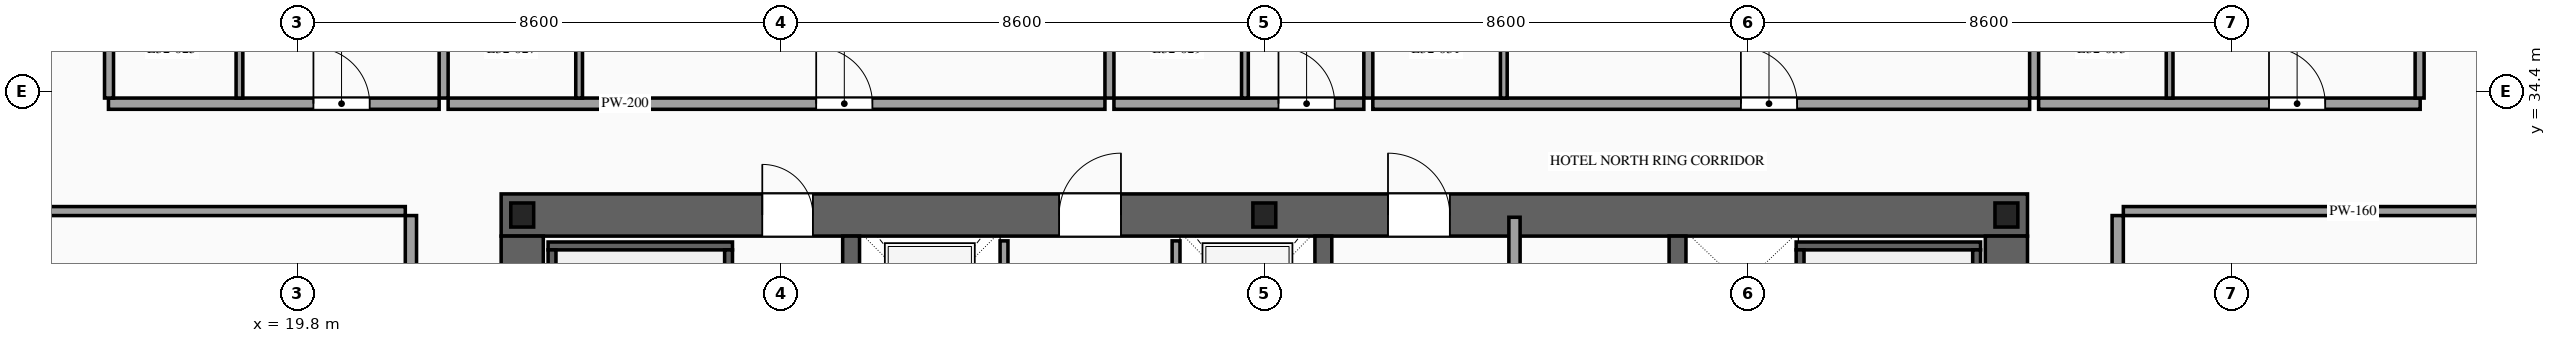
"""IFC4 building model, lengths in metres.
Left out: names, types, materials, properties, quantities, classifications, styles, units other than length and angle.
Written with IfcOpenShell. Run it as: python <this file> out.ifc"""

import sys

from ifc_helpers import new_model, si_unit, direction, frame, frame_2d, origin, origin_2d, place, context, subcontext, project, spatial, rectangle, i_section, extrude, source, transform, mapped, element, fill, save


model = new_model("IFC4")
c1 = context("Model", 3, precision=1e-05, world=origin(), true_north=direction((0.0, 1.0)))
c2 = subcontext(c1, "Body", "Model", "MODEL_VIEW")
j1 = project(units=[si_unit("LENGTHUNIT", "METRE"), si_unit("PLANEANGLEUNIT", "RADIAN")], contexts=[c1])
p1 = place(None, origin())
s1 = spatial("IfcSite", under=j1, at=p1, CompositionType="ELEMENT")
p2 = place(p1, origin())
s2 = spatial("IfcBuilding", under=s1, at=p2, CompositionType="ELEMENT")
p3 = place(p2, frame((0.0, 0.0, 122.6)))
s3 = spatial("IfcBuildingStorey", under=s2, at=p3, CompositionType="ELEMENT", Elevation=122.6)
p4 = place(p3, frame((23.425, 32.2, 0.0), z_axis=(0.0, 0.0, 1.0), x_axis=(1.0, 0.0, 0.0)))
e1 = element("IfcWall", 1, at=p4, inside=s3, PredefinedType="SHEAR", context=c2, shape_type="SweptSolid", body=[
    extrude(rectangle(XDim=27.15, YDim=0.75, at=frame_2d((13.575, 0.0))), origin(), (0.0, 0.0, 1.0), 3.6),
])
p5 = place(p4, frame((4.645, 0.0, 0.0)))
e2 = element("IfcOpeningElement", 2, at=p5, cuts=e1, PredefinedType="OPENING", context=c2, shape_type="SweptSolid", body=[
    extrude(rectangle(XDim=0.9, YDim=2.15, at=frame_2d((0.45, 1.075))), frame((0.0, 0.39, 0.0), z_axis=(0.0, -1.0, 0.0), x_axis=(1.0, 0.0, 0.0)), (0.0, 0.0, 1.0), 0.78),
])
p6 = place(p4, frame((9.925, 0.0, 0.0)))
e3 = element("IfcOpeningElement", 3, at=p6, cuts=e1, PredefinedType="OPENING", context=c2, shape_type="SweptSolid", body=[
    extrude(rectangle(XDim=1.1, YDim=2.2, at=frame_2d((0.55, 1.1))), frame((0.0, 0.39, 0.0), z_axis=(0.0, -1.0, 0.0), x_axis=(1.0, 0.0, 0.0)), (0.0, 0.0, 1.0), 0.78),
])
p7 = place(p4, frame((15.775, 0.0, 0.0)))
e4 = element("IfcOpeningElement", 4, at=p7, cuts=e1, PredefinedType="OPENING", context=c2, shape_type="SweptSolid", body=[
    extrude(rectangle(XDim=1.1, YDim=2.2, at=frame_2d((0.55, 1.1))), frame((0.0, 0.39, 0.0), z_axis=(0.0, -1.0, 0.0), x_axis=(1.0, 0.0, 0.0)), (0.0, 0.0, 1.0), 0.78),
])
m1 = source(origin(), c2, "Body", "SweptSolid", [
    extrude(rectangle(XDim=12.05, YDim=0.75, at=frame_2d((6.025, 0.0))), origin(), (0.0, 0.0, 1.0), 3.6),
])
for number, where, z_axis, x_axis in (
    (5, (23.8, 19.775, 0.0), (0.0, 0.0, 1.0), (0.0, 1.0, 0.0)),
    (6, (50.2, 19.775, 0.0), (0.0, 0.0, 1.0), (0.0, 1.0, 0.0)),
):
    element("IfcWall", number, at=place(p3, frame(where, z_axis=z_axis, x_axis=x_axis)), inside=s3, PredefinedType="SHEAR", context=c2, shape_type="MappedRepresentation", body=[
        mapped(m1, transform((0.0, 0.0, 0.0), scale=1.0)),
    ])
m2 = source(origin(), c2, "Body", "SweptSolid", [
    extrude(rectangle(XDim=12.05, YDim=0.3, at=frame_2d((6.025, 0.0))), origin(), (0.0, 0.0, 1.0), 3.6),
])
for number, where, z_axis, x_axis in (
    (7, (29.65, 19.775, 0.0), (0.0, 0.0, 1.0), (0.0, 1.0, 0.0)),
    (8, (38.05, 19.775, 0.0), (0.0, 0.0, 1.0), (0.0, 1.0, 0.0)),
    (9, (44.35, 19.775, 0.0), (0.0, 0.0, 1.0), (0.0, 1.0, 0.0)),
):
    element("IfcWall", number, at=place(p3, frame(where, z_axis=z_axis, x_axis=x_axis)), inside=s3, PredefinedType="SOLIDWALL", context=c2, shape_type="MappedRepresentation", body=[
        mapped(m2, transform((0.0, 0.0, 0.0), scale=1.0)),
    ])
m3 = source(origin(), c2, "Body", "SweptSolid", [
    extrude(i_section(OverallWidth=0.407, OverallDepth=0.428, WebThickness=0.02, FlangeThickness=0.035, at=origin_2d()), origin(), (0.0, 0.0, 1.0), 3.6),
])
for number, where, z_axis, x_axis in (
    (10, (23.8, 32.2, 0.0), (0.0, 0.0, 1.0), (1.0, 0.0, 0.0)),
    (11, (37.0, 32.2, 0.0), (0.0, 0.0, 1.0), (1.0, 0.0, 0.0)),
    (12, (50.2, 32.2, 0.0), (0.0, 0.0, 1.0), (1.0, 0.0, 0.0)),
):
    element("IfcColumn", number, at=place(p3, frame(where, z_axis=z_axis, x_axis=x_axis)), inside=s3, PredefinedType="COLUMN", context=c2, shape_type="MappedRepresentation", body=[
        mapped(m3, transform((0.0, 0.0, 0.0), scale=1.0)),
    ])
p8 = place(p3, frame((32.37, 29.4, 0.0), z_axis=(0.0, 0.0, 1.0), x_axis=(0.0, 1.0, 0.0)))
e13 = element("IfcWall", 13, at=p8, inside=s3, PredefinedType="SOLIDWALL", context=c2, shape_type="SweptSolid", body=[
    extrude(rectangle(XDim=2.34, YDim=0.14, at=frame_2d((1.17, 0.0))), origin(), (0.0, 0.0, 1.0), 3.38),
])
p9 = place(p8, frame((0.62, 0.0, 0.0)))
e14 = element("IfcOpeningElement", 14, at=p9, cuts=e13, PredefinedType="OPENING", context=c2, shape_type="SweptSolid", body=[
    extrude(rectangle(XDim=1.1, YDim=2.2, at=frame_2d((0.55, 1.1))), frame((0.0, 0.085, 0.0), z_axis=(0.0, -1.0, 0.0), x_axis=(1.0, 0.0, 0.0)), (0.0, 0.0, 1.0), 0.17),
])
p10 = place(p3, frame((35.43, 29.4, 0.0), z_axis=(0.0, 0.0, 1.0), x_axis=(0.0, 1.0, 0.0)))
e15 = element("IfcWall", 15, at=p10, inside=s3, PredefinedType="SOLIDWALL", context=c2, shape_type="SweptSolid", body=[
    extrude(rectangle(XDim=2.34, YDim=0.14, at=frame_2d((1.17, 0.0))), origin(), (0.0, 0.0, 1.0), 3.38),
])
p11 = place(p10, frame((0.62, 0.0, 0.0)))
e16 = element("IfcOpeningElement", 16, at=p11, cuts=e15, PredefinedType="OPENING", context=c2, shape_type="SweptSolid", body=[
    extrude(rectangle(XDim=1.1, YDim=2.2, at=frame_2d((0.55, 1.1))), frame((0.0, 0.085, 0.0), z_axis=(0.0, -1.0, 0.0), x_axis=(1.0, 0.0, 0.0)), (0.0, 0.0, 1.0), 0.17),
])
m4 = source(origin(), c2, "Body", "SweptSolid", [
    extrude(rectangle(XDim=3.28, YDim=0.14, at=frame_2d((1.64, 0.0))), origin(), (0.0, 0.0, 1.0), 3.38),
])
p12 = place(p3, frame((24.26, 31.65, 0.0), z_axis=(0.0, 0.0, 1.0), x_axis=(1.0, 0.0, 0.0)))
e17 = element("IfcWall", 17, at=p12, inside=s3, PredefinedType="SOLIDWALL", context=c2, shape_type="MappedRepresentation", body=[
    mapped(m4, transform((0.0, 0.0, 0.0), scale=1.0)),
])
m5 = source(origin(), c2, "Body", "SweptSolid", [
    extrude(rectangle(XDim=8.94, YDim=0.14, at=frame_2d((4.47, 0.0))), origin(), (0.0, 0.0, 1.0), 3.38),
])
for number, where, z_axis, x_axis in (
    (18, (24.33, 22.64, 0.0), (0.0, 0.0, 1.0), (0.0, 1.0, 0.0)),
    (19, (27.47, 22.64, 0.0), (0.0, 0.0, 1.0), (0.0, 1.0, 0.0)),
):
    element("IfcWall", number, at=place(p3, frame(where, z_axis=z_axis, x_axis=x_axis)), inside=s3, PredefinedType="SOLIDWALL", context=c2, shape_type="MappedRepresentation", body=[
        mapped(m5, transform((0.0, 0.0, 0.0), scale=1.0)),
    ])
p13 = place(p3, frame((46.46, 31.65, 0.0), z_axis=(0.0, 0.0, 1.0), x_axis=(1.0, 0.0, 0.0)))
e20 = element("IfcWall", 20, at=p13, inside=s3, PredefinedType="SOLIDWALL", context=c2, shape_type="MappedRepresentation", body=[
    mapped(m4, transform((0.0, 0.0, 0.0), scale=1.0)),
])
for number, where, z_axis, x_axis in (
    (21, (46.53, 22.64, 0.0), (0.0, 0.0, 1.0), (0.0, 1.0, 0.0)),
    (22, (49.67, 22.64, 0.0), (0.0, 0.0, 1.0), (0.0, 1.0, 0.0)),
):
    element("IfcWall", number, at=place(p3, frame(where, z_axis=z_axis, x_axis=x_axis)), inside=s3, PredefinedType="SOLIDWALL", context=c2, shape_type="MappedRepresentation", body=[
        mapped(m5, transform((0.0, 0.0, 0.0), scale=1.0)),
    ])
m6 = source(origin(), c2, "Body", "SweptSolid", [
    extrude(rectangle(XDim=12.72, YDim=0.2, at=frame_2d((6.36, 0.0))), origin(), (0.0, 0.0, 1.0), 3.38),
])
p14 = place(p3, frame((41.45, 19.44, 0.0), z_axis=(0.0, 0.0, 1.0), x_axis=(0.0, 1.0, 0.0)))
e23 = element("IfcWall", 23, at=p14, inside=s3, PredefinedType="PARTITIONING", context=c2, shape_type="MappedRepresentation", body=[
    mapped(m6, transform((0.0, 0.0, 0.0), scale=1.0)),
])
p15 = place(p3, frame((16.44, 34.18, 0.0), z_axis=(0.0, 0.0, 1.0), x_axis=(1.0, 0.0, 0.0)))
e24 = element("IfcWall", 24, at=p15, inside=s3, PredefinedType="PARTITIONING", context=c2, shape_type="SweptSolid", body=[
    extrude(rectangle(XDim=5.882, YDim=0.2, at=frame_2d((2.941, 0.0))), origin(), (0.0, 0.0, 1.0), 3.38),
])
p16 = place(p15, frame((3.646, 0.0, 0.0)))
e25 = element("IfcOpeningElement", 25, at=p16, cuts=e24, PredefinedType="OPENING", context=c2, shape_type="SweptSolid", body=[
    extrude(rectangle(XDim=1.0, YDim=2.2, at=frame_2d((0.5, 1.1))), frame((0.0, 0.115, 0.0), z_axis=(0.0, -1.0, 0.0), x_axis=(1.0, 0.0, 0.0)), (0.0, 0.0, 1.0), 0.23),
])
m7 = source(origin(), c2, "Body", "SweptSolid", [
    extrude(rectangle(XDim=14.97, YDim=0.16, at=frame_2d((7.485, 0.0))), origin(), (0.0, 0.0, 1.0), 3.38),
])
p17 = place(p3, frame((22.402, 34.28, 0.0), z_axis=(0.0, 0.0, 1.0), x_axis=(0.0, 1.0, 0.0)))
e26 = element("IfcWall", 26, at=p17, inside=s3, PredefinedType="PARTITIONING", context=c2, shape_type="MappedRepresentation", body=[
    mapped(m7, transform((0.0, 0.0, 0.0), scale=1.0)),
])
m8 = source(origin(), c2, "Body", "SweptSolid", [
    extrude(rectangle(XDim=2.42, YDim=0.12, at=frame_2d((1.21, 0.0))), origin(), (0.0, 0.0, 1.0), 3.38),
])
p18 = place(p3, frame((18.77, 34.28, 0.0), z_axis=(0.0, 0.0, 1.0), x_axis=(0.0, 1.0, 0.0)))
e27 = element("IfcWall", 27, at=p18, inside=s3, PredefinedType="PARTITIONING", context=c2, shape_type="MappedRepresentation", body=[
    mapped(m8, transform((0.0, 0.0, 0.0), scale=1.0)),
])
p19 = place(p3, frame((22.482, 34.18, 0.0), z_axis=(0.0, 0.0, 1.0), x_axis=(1.0, 0.0, 0.0)))
e28 = element("IfcWall", 28, at=p19, inside=s3, PredefinedType="PARTITIONING", context=c2, shape_type="SweptSolid", body=[
    extrude(rectangle(XDim=11.683, YDim=0.2, at=frame_2d((5.842, 0.0))), origin(), (0.0, 0.0, 1.0), 3.38),
])
p20 = place(p19, frame((6.547, 0.0, 0.0)))
e29 = element("IfcOpeningElement", 29, at=p20, cuts=e28, PredefinedType="OPENING", context=c2, shape_type="SweptSolid", body=[
    extrude(rectangle(XDim=1.0, YDim=2.2, at=frame_2d((0.5, 1.1))), frame((0.0, 0.115, 0.0), z_axis=(0.0, -1.0, 0.0), x_axis=(1.0, 0.0, 0.0)), (0.0, 0.0, 1.0), 0.23),
])
p21 = place(p3, frame((34.245, 34.28, 0.0), z_axis=(0.0, 0.0, 1.0), x_axis=(0.0, 1.0, 0.0)))
e30 = element("IfcWall", 30, at=p21, inside=s3, PredefinedType="PARTITIONING", context=c2, shape_type="MappedRepresentation", body=[
    mapped(m7, transform((0.0, 0.0, 0.0), scale=1.0)),
])
p22 = place(p3, frame((24.812, 34.28, 0.0), z_axis=(0.0, 0.0, 1.0), x_axis=(0.0, 1.0, 0.0)))
e31 = element("IfcWall", 31, at=p22, inside=s3, PredefinedType="PARTITIONING", context=c2, shape_type="MappedRepresentation", body=[
    mapped(m8, transform((0.0, 0.0, 0.0), scale=1.0)),
])
p23 = place(p3, frame((34.325, 34.18, 0.0), z_axis=(0.0, 0.0, 1.0), x_axis=(1.0, 0.0, 0.0)))
e32 = element("IfcWall", 32, at=p23, inside=s3, PredefinedType="PARTITIONING", context=c2, shape_type="SweptSolid", body=[
    extrude(rectangle(XDim=4.445, YDim=0.2, at=frame_2d((2.223, 0.0))), origin(), (0.0, 0.0, 1.0), 3.38),
])
p24 = place(p23, frame((2.927, 0.0, 0.0)))
e33 = element("IfcOpeningElement", 33, at=p24, cuts=e32, PredefinedType="OPENING", context=c2, shape_type="SweptSolid", body=[
    extrude(rectangle(XDim=1.0, YDim=2.2, at=frame_2d((0.5, 1.1))), frame((0.0, 0.115, 0.0), z_axis=(0.0, -1.0, 0.0), x_axis=(1.0, 0.0, 0.0)), (0.0, 0.0, 1.0), 0.23),
])
p25 = place(p3, frame((38.85, 34.28, 0.0), z_axis=(0.0, 0.0, 1.0), x_axis=(0.0, 1.0, 0.0)))
e34 = element("IfcWall", 34, at=p25, inside=s3, PredefinedType="PARTITIONING", context=c2, shape_type="MappedRepresentation", body=[
    mapped(m7, transform((0.0, 0.0, 0.0), scale=1.0)),
])
p26 = place(p3, frame((36.655, 34.28, 0.0), z_axis=(0.0, 0.0, 1.0), x_axis=(0.0, 1.0, 0.0)))
e35 = element("IfcWall", 35, at=p26, inside=s3, PredefinedType="PARTITIONING", context=c2, shape_type="MappedRepresentation", body=[
    mapped(m8, transform((0.0, 0.0, 0.0), scale=1.0)),
])
p27 = place(p3, frame((38.93, 34.18, 0.0), z_axis=(0.0, 0.0, 1.0), x_axis=(1.0, 0.0, 0.0)))
e36 = element("IfcWall", 36, at=p27, inside=s3, PredefinedType="PARTITIONING", context=c2, shape_type="SweptSolid", body=[
    extrude(rectangle(XDim=11.683, YDim=0.2, at=frame_2d((5.842, 0.0))), origin(), (0.0, 0.0, 1.0), 3.38),
])
p28 = place(p27, frame((6.547, 0.0, 0.0)))
e37 = element("IfcOpeningElement", 37, at=p28, cuts=e36, PredefinedType="OPENING", context=c2, shape_type="SweptSolid", body=[
    extrude(rectangle(XDim=1.0, YDim=2.2, at=frame_2d((0.5, 1.1))), frame((0.0, 0.115, 0.0), z_axis=(0.0, -1.0, 0.0), x_axis=(1.0, 0.0, 0.0)), (0.0, 0.0, 1.0), 0.23),
])
p29 = place(p3, frame((50.693, 34.28, 0.0), z_axis=(0.0, 0.0, 1.0), x_axis=(0.0, 1.0, 0.0)))
e38 = element("IfcWall", 38, at=p29, inside=s3, PredefinedType="PARTITIONING", context=c2, shape_type="MappedRepresentation", body=[
    mapped(m7, transform((0.0, 0.0, 0.0), scale=1.0)),
])
p30 = place(p3, frame((41.26, 34.28, 0.0), z_axis=(0.0, 0.0, 1.0), x_axis=(0.0, 1.0, 0.0)))
e39 = element("IfcWall", 39, at=p30, inside=s3, PredefinedType="PARTITIONING", context=c2, shape_type="MappedRepresentation", body=[
    mapped(m8, transform((0.0, 0.0, 0.0), scale=1.0)),
])
p31 = place(p3, frame((50.773, 34.18, 0.0), z_axis=(0.0, 0.0, 1.0), x_axis=(1.0, 0.0, 0.0)))
e40 = element("IfcWall", 40, at=p31, inside=s3, PredefinedType="PARTITIONING", context=c2, shape_type="SweptSolid", body=[
    extrude(rectangle(XDim=6.787, YDim=0.2, at=frame_2d((3.394, 0.0))), origin(), (0.0, 0.0, 1.0), 3.38),
])
p32 = place(p31, frame((4.098, 0.0, 0.0)))
e41 = element("IfcOpeningElement", 41, at=p32, cuts=e40, PredefinedType="OPENING", context=c2, shape_type="SweptSolid", body=[
    extrude(rectangle(XDim=1.0, YDim=2.2, at=frame_2d((0.5, 1.1))), frame((0.0, 0.115, 0.0), z_axis=(0.0, -1.0, 0.0), x_axis=(1.0, 0.0, 0.0)), (0.0, 0.0, 1.0), 0.23),
])
m9 = source(origin(), c2, "Body", "SweptSolid", [
    extrude(rectangle(XDim=14.82, YDim=0.16, at=frame_2d((7.41, 0.0))), origin(), (0.0, 0.0, 1.0), 3.38),
])
for number, where, z_axis, x_axis in (
    (42, (16.45, 34.28, 0.0), (0.0, 0.0, 1.0), (0.0, 1.0, 0.0)),
    (43, (57.55, 34.28, 0.0), (0.0, 0.0, 1.0), (0.0, 1.0, 0.0)),
):
    element("IfcWall", number, at=place(p3, frame(where, z_axis=z_axis, x_axis=x_axis)), inside=s3, PredefinedType="PARTITIONING", context=c2, shape_type="MappedRepresentation", body=[
        mapped(m9, transform((0.0, 0.0, 0.0), scale=1.0)),
    ])
p33 = place(p3, frame((53.103, 34.28, 0.0), z_axis=(0.0, 0.0, 1.0), x_axis=(0.0, 1.0, 0.0)))
e44 = element("IfcWall", 44, at=p33, inside=s3, PredefinedType="PARTITIONING", context=c2, shape_type="MappedRepresentation", body=[
    mapped(m8, transform((0.0, 0.0, 0.0), scale=1.0)),
])
p34 = place(p3, frame((21.82, 19.41, 0.0), z_axis=(0.0, 0.0, 1.0), x_axis=(0.0, 1.0, 0.0)))
e45 = element("IfcWall", 45, at=p34, inside=s3, PredefinedType="PARTITIONING", context=c2, shape_type="SweptSolid", body=[
    extrude(rectangle(XDim=12.78, YDim=0.2, at=frame_2d((6.39, 0.0))), origin(), (0.0, 0.0, 1.0), 3.38),
])
p35 = place(p34, frame((5.89, 0.0, 0.0)))
e46 = element("IfcOpeningElement", 46, at=p35, cuts=e45, PredefinedType="OPENING", context=c2, shape_type="SweptSolid", body=[
    extrude(rectangle(XDim=1.0, YDim=2.2, at=frame_2d((0.5, 1.1))), frame((0.0, 0.115, 0.0), z_axis=(0.0, -1.0, 0.0), x_axis=(1.0, 0.0, 0.0)), (0.0, 0.0, 1.0), 0.23),
])
m10 = source(origin(), c2, "Body", "SweptSolid", [
    extrude(rectangle(XDim=8.17, YDim=0.16, at=frame_2d((4.085, 0.0))), origin(), (0.0, 0.0, 1.0), 2.875),
])
p36 = place(p3, frame((13.55, 32.27, 0.0), z_axis=(0.0, 0.0, 1.0), x_axis=(1.0, 0.0, 0.0)))
e47 = element("IfcWall", 47, at=p36, inside=s3, PredefinedType="PARTITIONING", context=c2, shape_type="MappedRepresentation", body=[
    mapped(m10, transform((0.0, 0.0, 0.0), scale=1.0)),
])
p37 = place(p3, frame((52.18, 25.88, 0.0), z_axis=(0.0, 0.0, 1.0), x_axis=(0.0, 1.0, 0.0)))
e48 = element("IfcWall", 48, at=p37, inside=s3, PredefinedType="PARTITIONING", context=c2, shape_type="SweptSolid", body=[
    extrude(rectangle(XDim=6.31, YDim=0.2, at=frame_2d((3.155, 0.0))), origin(), (0.0, 0.0, 1.0), 3.38),
])
p38 = place(p37, frame((3.835, 0.0, 0.0)))
e49 = element("IfcOpeningElement", 49, at=p38, cuts=e48, PredefinedType="OPENING", context=c2, shape_type="SweptSolid", body=[
    extrude(rectangle(XDim=1.0, YDim=2.2, at=frame_2d((0.5, 1.1))), frame((0.0, 0.115, 0.0), z_axis=(0.0, -1.0, 0.0), x_axis=(1.0, 0.0, 0.0)), (0.0, 0.0, 1.0), 0.23),
])
p39 = place(p3, frame((52.28, 32.27, 0.0), z_axis=(0.0, 0.0, 1.0), x_axis=(1.0, 0.0, 0.0)))
e50 = element("IfcWall", 50, at=p39, inside=s3, PredefinedType="PARTITIONING", context=c2, shape_type="MappedRepresentation", body=[
    mapped(m10, transform((0.0, 0.0, 0.0), scale=1.0)),
])
m11 = source(origin(), c2, "Body", "SweptSolid", [
    extrude(rectangle(XDim=0.9, YDim=2.15, at=frame_2d((0.45, 1.075))), frame((0.0, 0.025, 0.0), z_axis=(0.0, -1.0, 0.0), x_axis=(1.0, 0.0, 0.0)), (0.0, 0.0, 1.0), 0.05),
])
p40 = place(p5, origin())
e51 = element("IfcDoor", 51, at=p40, inside=s3, OperationType="SINGLE_SWING_LEFT", PredefinedType="DOOR", context=c2, shape_type="MappedRepresentation", body=[
    mapped(m11, transform((0.0, 0.0, 0.0), scale=1.0)),
])
fill(e2, e51)
m12 = source(origin(), c2, "Body", "SweptSolid", [
    extrude(rectangle(XDim=1.1, YDim=2.2, at=frame_2d((0.55, 1.1))), frame((0.0, 0.025, 0.0), z_axis=(0.0, -1.0, 0.0), x_axis=(1.0, 0.0, 0.0)), (0.0, 0.0, 1.0), 0.05),
])
p41 = place(p6, origin())
e52 = element("IfcDoor", 52, at=p41, inside=s3, OperationType="SINGLE_SWING_RIGHT", PredefinedType="DOOR", context=c2, shape_type="MappedRepresentation", body=[
    mapped(m12, transform((0.0, 0.0, 0.0), scale=1.0)),
])
fill(e3, e52)
p42 = place(p7, origin())
e53 = element("IfcDoor", 53, at=p42, inside=s3, OperationType="SINGLE_SWING_LEFT", PredefinedType="DOOR", context=c2, shape_type="MappedRepresentation", body=[
    mapped(m12, transform((0.0, 0.0, 0.0), scale=1.0)),
])
fill(e4, e53)
m13 = source(origin(), c2, "Body", "SweptSolid", [
    extrude(rectangle(XDim=1.0, YDim=2.2, at=frame_2d((0.5, 1.1))), frame((0.0, 0.025, 0.0), z_axis=(0.0, -1.0, 0.0), x_axis=(1.0, 0.0, 0.0)), (0.0, 0.0, 1.0), 0.05),
])
p43 = place(p16, origin())
e54 = element("IfcDoor", 54, at=p43, inside=s3, OperationType="SINGLE_SWING_LEFT", PredefinedType="DOOR", context=c2, shape_type="MappedRepresentation", body=[
    mapped(m13, transform((0.0, 0.0, 0.0), scale=1.0)),
])
fill(e25, e54)
p44 = place(p20, origin())
e55 = element("IfcDoor", 55, at=p44, inside=s3, OperationType="SINGLE_SWING_LEFT", PredefinedType="DOOR", context=c2, shape_type="MappedRepresentation", body=[
    mapped(m13, transform((0.0, 0.0, 0.0), scale=1.0)),
])
fill(e29, e55)
p45 = place(p24, origin())
e56 = element("IfcDoor", 56, at=p45, inside=s3, OperationType="SINGLE_SWING_LEFT", PredefinedType="DOOR", context=c2, shape_type="MappedRepresentation", body=[
    mapped(m13, transform((0.0, 0.0, 0.0), scale=1.0)),
])
fill(e33, e56)
p46 = place(p28, origin())
e57 = element("IfcDoor", 57, at=p46, inside=s3, OperationType="SINGLE_SWING_LEFT", PredefinedType="DOOR", context=c2, shape_type="MappedRepresentation", body=[
    mapped(m13, transform((0.0, 0.0, 0.0), scale=1.0)),
])
fill(e37, e57)
p47 = place(p32, origin())
e58 = element("IfcDoor", 58, at=p47, inside=s3, OperationType="SINGLE_SWING_LEFT", PredefinedType="DOOR", context=c2, shape_type="MappedRepresentation", body=[
    mapped(m13, transform((0.0, 0.0, 0.0), scale=1.0)),
])
fill(e41, e58)
save(model, sys.argv[1])
